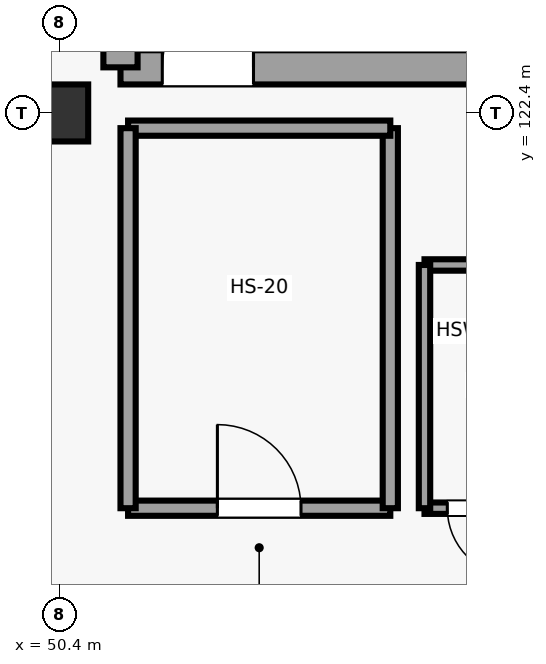
"""IFC4 building model, lengths in metres.
Left out: names, types, materials, properties, quantities, classifications, styles, units other than length and angle.
Written with IfcOpenShell. Run it as: python <this file> out.ifc"""

import sys

from ifc_helpers import new_model, si_unit, direction, frame, frame_2d, origin, origin_2d, place, context, subcontext, project, spatial, rectangle, extrude, element, fill, save


model = new_model("IFC4")
c1 = context("Model", 3, precision=1e-05, world=origin(), true_north=direction((0.0, 1.0)))
c2 = subcontext(c1, "Body", "Model", "MODEL_VIEW")
j1 = project(units=[si_unit("LENGTHUNIT", "METRE"), si_unit("PLANEANGLEUNIT", "RADIAN")], contexts=[c1])
p1 = place(None, origin())
s1 = spatial("IfcSite", under=j1, at=p1, CompositionType="ELEMENT")
p2 = place(p1, origin())
s2 = spatial("IfcBuilding", under=s1, at=p2, CompositionType="ELEMENT")
p3 = place(p2, frame((0.0, 0.0, 9.6)))
s3 = spatial("IfcBuildingStorey", under=s2, at=p3, CompositionType="ELEMENT", Elevation=9.6)
p4 = place(p3, frame((50.4, 122.4, 0.0), z_axis=(0.0, 0.0, 1.0), x_axis=(1.0, 0.0, 0.0)))
e1 = element("IfcColumn", 1, at=p4, inside=s3, PredefinedType="COLUMN", context=c2, shape_type="SweptSolid", body=[
    extrude(rectangle(XDim=0.75, YDim=0.75, at=origin_2d()), origin(), (0.0, 0.0, 1.0), 4.2),
])
p5 = place(p3, frame((51.2, 123.0, 0.0), z_axis=(0.0, 0.0, 1.0), x_axis=(1.0, 0.0, 0.0)))
e2 = element("IfcWall", 2, at=p5, inside=s3, PredefinedType="SHEAR", context=c2, shape_type="SweptSolid", body=[
    extrude(rectangle(XDim=12.8, YDim=0.45, at=frame_2d((6.4, 0.0))), origin(), (0.0, 0.0, 1.0), 3.88),
])
p6 = place(p5, frame((0.55, 0.0, 0.0)))
e3 = element("IfcOpeningElement", 3, at=p6, cuts=e2, PredefinedType="OPENING", context=c2, shape_type="SweptSolid", body=[
    extrude(rectangle(XDim=1.2, YDim=2.25, at=frame_2d((0.6, 1.125))), frame((0.0, 0.235, 0.0), z_axis=(0.0, -1.0, 0.0), x_axis=(1.0, 0.0, 0.0)), (0.0, 0.0, 1.0), 0.47),
])
p7 = place(p5, frame((10.458, 0.0, 0.0)))
e4 = element("IfcOpeningElement", 4, at=p7, cuts=e2, PredefinedType="OPENING", context=c2, shape_type="SweptSolid", body=[
    extrude(rectangle(XDim=1.1, YDim=2.2, at=frame_2d((0.55, 1.1))), frame((0.0, 0.235, 0.0), z_axis=(0.0, -1.0, 0.0), x_axis=(1.0, 0.0, 0.0)), (0.0, 0.0, 1.0), 0.47),
])
p8 = place(p3, frame((51.2, 123.0, 0.0), z_axis=(0.0, 0.0, 1.0), x_axis=(0.0, 1.0, 0.0)))
e5 = element("IfcWall", 5, at=p8, inside=s3, PredefinedType="SHEAR", context=c2, shape_type="SweptSolid", body=[
    extrude(rectangle(XDim=6.1, YDim=0.45, at=frame_2d((3.05, 0.0))), origin(), (0.0, 0.0, 1.0), 3.88),
])
p9 = place(p3, frame((51.3, 117.2, 0.0), z_axis=(0.0, 0.0, 1.0), x_axis=(1.0, 0.0, 0.0)))
e6 = element("IfcWall", 6, at=p9, inside=s3, PredefinedType="PARTITIONING", context=c2, shape_type="SweptSolid", body=[
    extrude(rectangle(XDim=3.45, YDim=0.2, at=frame_2d((1.725, 0.0))), origin(), (0.0, 0.0, 1.0), 2.94),
])
p10 = place(p9, frame((1.175, 0.0, 0.0)))
e7 = element("IfcOpeningElement", 7, at=p10, cuts=e6, PredefinedType="OPENING", context=c2, shape_type="SweptSolid", body=[
    extrude(rectangle(XDim=1.1, YDim=2.25, at=frame_2d((0.55, 1.125))), frame((0.0, 0.11, 0.0), z_axis=(0.0, -1.0, 0.0), x_axis=(1.0, 0.0, 0.0)), (0.0, 0.0, 1.0), 0.22),
])
p11 = place(p3, frame((54.75, 117.2, 0.0), z_axis=(0.0, 0.0, 1.0), x_axis=(0.0, 1.0, 0.0)))
e8 = element("IfcWall", 8, at=p11, inside=s3, PredefinedType="PARTITIONING", context=c2, shape_type="SweptSolid", body=[
    extrude(rectangle(XDim=5.0, YDim=0.2, at=frame_2d((2.5, 0.0))), origin(), (0.0, 0.0, 1.0), 2.94),
])
p12 = place(p3, frame((54.75, 122.2, 0.0), z_axis=(0.0, 0.0, 1.0), x_axis=(-1.0, 0.0, 0.0)))
e9 = element("IfcWall", 9, at=p12, inside=s3, PredefinedType="PARTITIONING", context=c2, shape_type="SweptSolid", body=[
    extrude(rectangle(XDim=3.45, YDim=0.2, at=frame_2d((1.725, 0.0))), origin(), (0.0, 0.0, 1.0), 2.94),
])
p13 = place(p3, frame((51.3, 122.2, 0.0), z_axis=(0.0, 0.0, 1.0), x_axis=(0.0, -1.0, 0.0)))
e10 = element("IfcWall", 10, at=p13, inside=s3, PredefinedType="PARTITIONING", context=c2, shape_type="SweptSolid", body=[
    extrude(rectangle(XDim=5.0, YDim=0.2, at=frame_2d((2.5, 0.0))), origin(), (0.0, 0.0, 1.0), 2.94),
])
p14 = place(p3, frame((55.2, 117.2, 0.0), z_axis=(0.0, 0.0, 1.0), x_axis=(1.0, 0.0, 0.0)))
e11 = element("IfcWall", 11, at=p14, inside=s3, PredefinedType="PARTITIONING", context=c2, shape_type="SweptSolid", body=[
    extrude(rectangle(XDim=1.5, YDim=0.15, at=frame_2d((0.75, 0.0))), origin(), (0.0, 0.0, 1.0), 2.94),
])
p15 = place(p14, frame((0.3, 0.0, 0.0)))
e12 = element("IfcOpeningElement", 12, at=p15, cuts=e11, PredefinedType="OPENING", context=c2, shape_type="SweptSolid", body=[
    extrude(rectangle(XDim=0.9, YDim=2.15, at=frame_2d((0.45, 1.075))), frame((0.0, 0.085, 0.0), z_axis=(0.0, -1.0, 0.0), x_axis=(1.0, 0.0, 0.0)), (0.0, 0.0, 1.0), 0.17),
])
p16 = place(p3, frame((56.7, 120.4, 0.0), z_axis=(0.0, 0.0, 1.0), x_axis=(-1.0, 0.0, 0.0)))
e13 = element("IfcWall", 13, at=p16, inside=s3, PredefinedType="PARTITIONING", context=c2, shape_type="SweptSolid", body=[
    extrude(rectangle(XDim=1.5, YDim=0.15, at=frame_2d((0.75, 0.0))), origin(), (0.0, 0.0, 1.0), 2.94),
])
p17 = place(p3, frame((55.2, 120.4, 0.0), z_axis=(0.0, 0.0, 1.0), x_axis=(0.0, -1.0, 0.0)))
e14 = element("IfcWall", 14, at=p17, inside=s3, PredefinedType="PARTITIONING", context=c2, shape_type="SweptSolid", body=[
    extrude(rectangle(XDim=3.2, YDim=0.15, at=frame_2d((1.6, 0.0))), origin(), (0.0, 0.0, 1.0), 2.94),
])
p18 = place(p6, origin())
e15 = element("IfcDoor", 15, at=p18, inside=s3, OperationType="SINGLE_SWING_RIGHT", PredefinedType="DOOR", context=c2, shape_type="SweptSolid", body=[
    extrude(rectangle(XDim=1.2, YDim=2.25, at=frame_2d((0.6, 1.125))), frame((0.0, 0.025, 0.0), z_axis=(0.0, -1.0, 0.0), x_axis=(1.0, 0.0, 0.0)), (0.0, 0.0, 1.0), 0.05),
])
fill(e3, e15)
p19 = place(p10, origin())
e16 = element("IfcDoor", 16, at=p19, inside=s3, OperationType="SINGLE_SWING_LEFT", PredefinedType="DOOR", context=c2, shape_type="SweptSolid", body=[
    extrude(rectangle(XDim=1.1, YDim=2.25, at=frame_2d((0.55, 1.125))), frame((0.0, 0.025, 0.0), z_axis=(0.0, -1.0, 0.0), x_axis=(1.0, 0.0, 0.0)), (0.0, 0.0, 1.0), 0.05),
])
fill(e7, e16)
p20 = place(p15, frame((0.9, 0.0, 0.0), z_axis=(0.0, 0.0, 1.0), x_axis=(-1.0, 0.0, 0.0)))
e17 = element("IfcDoor", 17, at=p20, inside=s3, OperationType="SINGLE_SWING_RIGHT", PredefinedType="DOOR", context=c2, shape_type="SweptSolid", body=[
    extrude(rectangle(XDim=0.9, YDim=2.15, at=frame_2d((0.45, 1.075))), frame((0.0, 0.025, 0.0), z_axis=(0.0, -1.0, 0.0), x_axis=(1.0, 0.0, 0.0)), (0.0, 0.0, 1.0), 0.05),
])
fill(e12, e17)
save(model, sys.argv[1])
